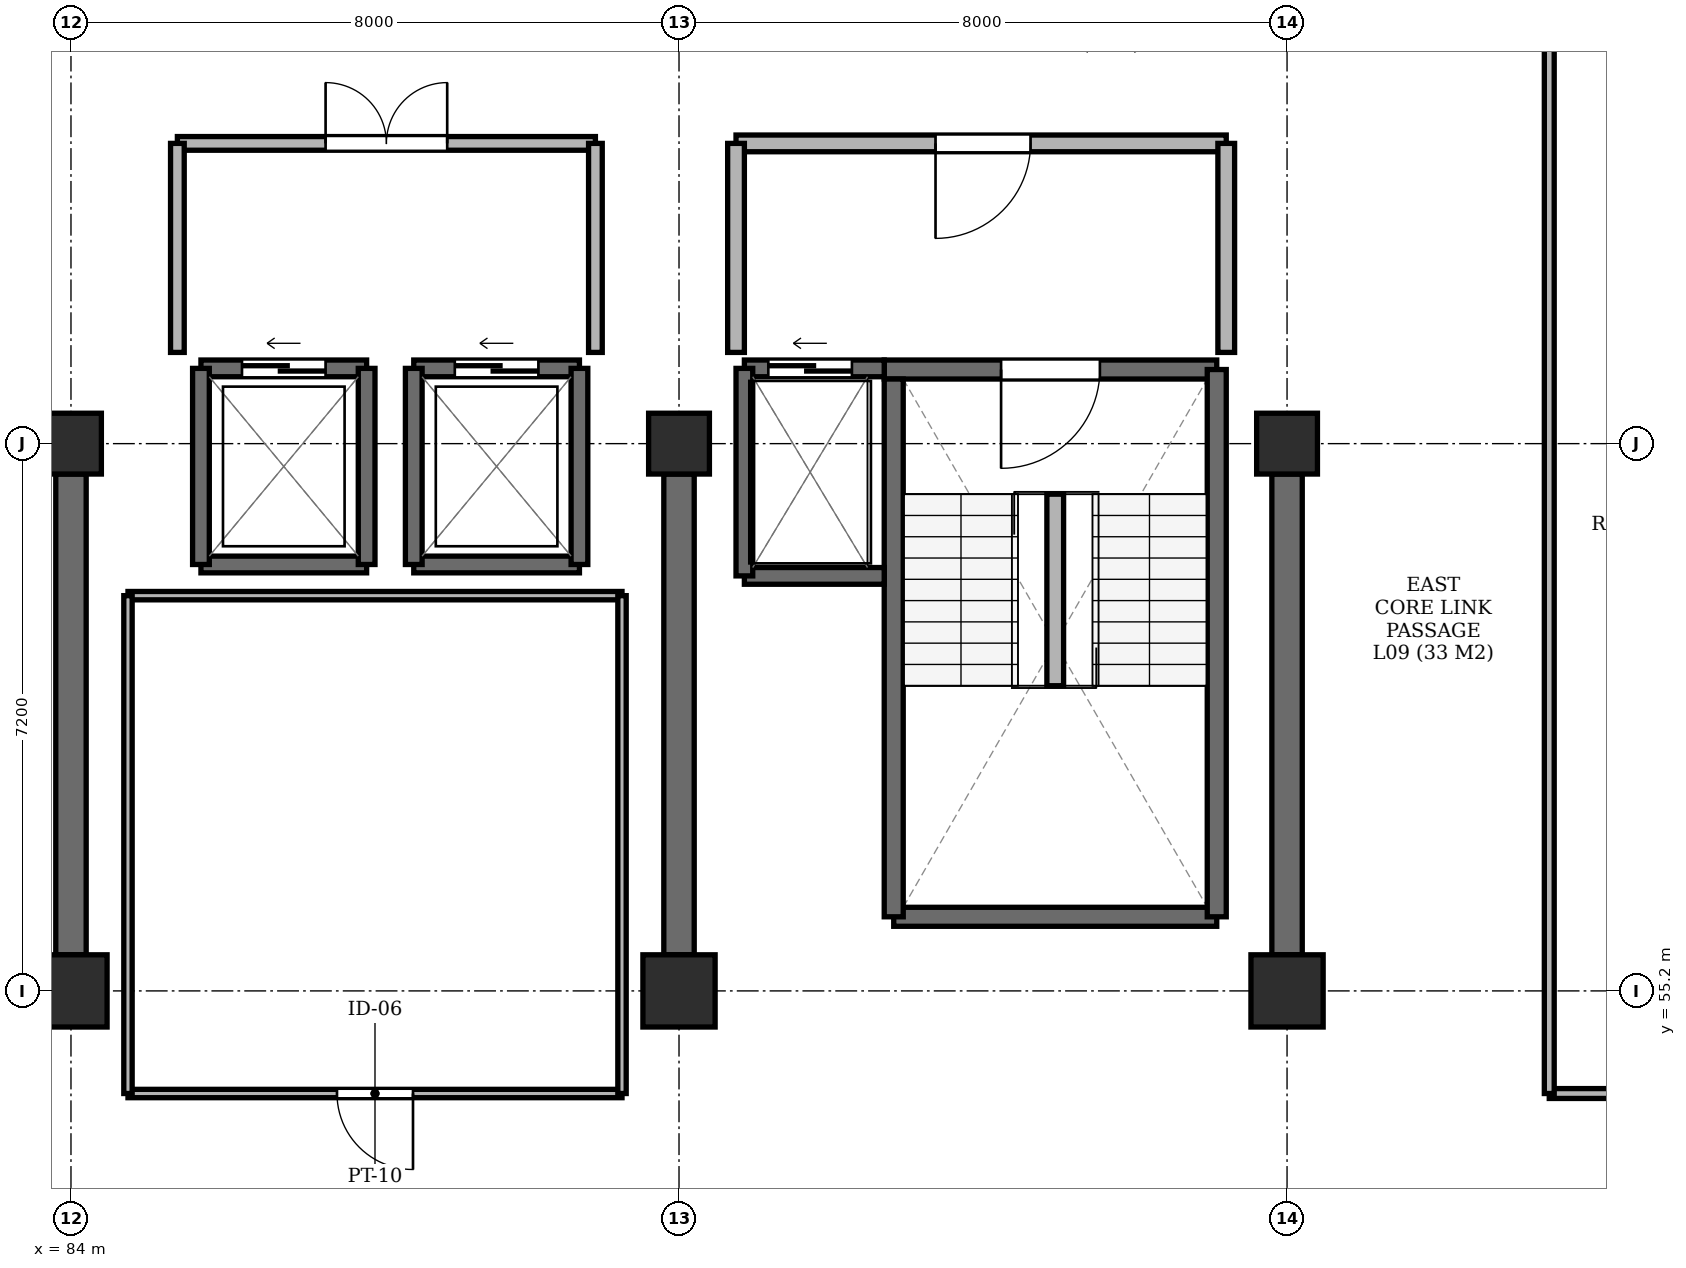
"""IFC4 building model, lengths in metres.
Left out: names, types, materials, properties, quantities, classifications, styles, units other than length and angle.
Written with IfcOpenShell. Run it as: python <this file> out.ifc"""

import sys

from ifc_helpers import new_model, si_unit, direction, frame, frame_2d, origin, origin_2d, place, context, subcontext, project, spatial, rectangle, extrude, element, fill, save


model = new_model("IFC4")
c1 = context("Model", 3, precision=1e-05, world=origin(), true_north=direction((0.0, 1.0)))
c2 = subcontext(c1, "Body", "Model", "MODEL_VIEW")
j1 = project(units=[si_unit("LENGTHUNIT", "METRE"), si_unit("PLANEANGLEUNIT", "RADIAN")], contexts=[c1])
p1 = place(None, origin())
s1 = spatial("IfcSite", under=j1, at=p1, CompositionType="ELEMENT")
p2 = place(p1, origin())
s2 = spatial("IfcBuilding", under=s1, at=p2, CompositionType="ELEMENT")
p3 = place(p2, frame((0.0, 0.0, 40.55)))
s3 = spatial("IfcBuildingStorey", under=s2, at=p3, CompositionType="ELEMENT", Elevation=40.55)
p4 = place(p3, frame((84.0, 55.2, -0.24), z_axis=(0.0, 0.0, 1.0), x_axis=(1.0, 0.0, 0.0)))
e1 = element("IfcColumn", 1, at=p4, inside=s3, PredefinedType="COLUMN", context=c2, shape_type="SweptSolid", body=[
    extrude(rectangle(XDim=0.95, YDim=0.95, at=origin_2d()), origin(), (0.0, 0.0, 1.0), 3.25),
])
p5 = place(p3, frame((84.0, 62.4, -0.24), z_axis=(0.0, 0.0, 1.0), x_axis=(1.0, 0.0, 0.0)))
e2 = element("IfcColumn", 2, at=p5, inside=s3, PredefinedType="COLUMN", context=c2, shape_type="SweptSolid", body=[
    extrude(rectangle(XDim=0.8, YDim=0.8, at=origin_2d()), origin(), (0.0, 0.0, 1.0), 3.25),
])
p6 = place(p3, frame((92.0, 55.2, -0.24), z_axis=(0.0, 0.0, 1.0), x_axis=(1.0, 0.0, 0.0)))
e3 = element("IfcColumn", 3, at=p6, inside=s3, PredefinedType="COLUMN", context=c2, shape_type="SweptSolid", body=[
    extrude(rectangle(XDim=0.95, YDim=0.95, at=origin_2d()), origin(), (0.0, 0.0, 1.0), 3.25),
])
p7 = place(p3, frame((92.0, 62.4, -0.24), z_axis=(0.0, 0.0, 1.0), x_axis=(1.0, 0.0, 0.0)))
e4 = element("IfcColumn", 4, at=p7, inside=s3, PredefinedType="COLUMN", context=c2, shape_type="SweptSolid", body=[
    extrude(rectangle(XDim=0.8, YDim=0.8, at=origin_2d()), origin(), (0.0, 0.0, 1.0), 3.25),
])
p8 = place(p3, frame((100.0, 55.2, -0.24), z_axis=(0.0, 0.0, 1.0), x_axis=(1.0, 0.0, 0.0)))
e5 = element("IfcColumn", 5, at=p8, inside=s3, PredefinedType="COLUMN", context=c2, shape_type="SweptSolid", body=[
    extrude(rectangle(XDim=0.95, YDim=0.95, at=origin_2d()), origin(), (0.0, 0.0, 1.0), 3.25),
])
p9 = place(p3, frame((100.0, 62.4, -0.24), z_axis=(0.0, 0.0, 1.0), x_axis=(1.0, 0.0, 0.0)))
e6 = element("IfcColumn", 6, at=p9, inside=s3, PredefinedType="COLUMN", context=c2, shape_type="SweptSolid", body=[
    extrude(rectangle(XDim=0.8, YDim=0.8, at=origin_2d()), origin(), (0.0, 0.0, 1.0), 3.25),
])
for number, where, z_axis, x_axis in (
    (7, (84.0, 55.675, 0.0), (0.0, 0.0, 1.0), (0.0, 1.0, 0.0)),
    (8, (92.0, 55.675, 0.0), (0.0, 0.0, 1.0), (0.0, 1.0, 0.0)),
    (9, (100.0, 55.675, 0.0), (0.0, 0.0, 1.0), (0.0, 1.0, 0.0)),
):
    element("IfcWall", number, at=place(p3, frame(where, z_axis=z_axis, x_axis=x_axis)), inside=s3, PredefinedType="SHEAR", context=c2, shape_type="SweptSolid", body=[
        extrude(rectangle(XDim=6.325, YDim=0.4, at=frame_2d((3.163, 0.0))), origin(), (0.0, 0.0, 1.0), 3.01),
    ])
p10 = place(p3, frame((94.825, 56.175, 0.0), z_axis=(0.0, 0.0, 1.0), x_axis=(1.0, 0.0, 0.0)))
e10 = element("IfcWall", 10, at=p10, inside=s3, PredefinedType="SHEAR", context=c2, shape_type="SweptSolid", body=[
    extrude(rectangle(XDim=4.25, YDim=0.25, at=frame_2d((2.125, 0.0))), origin(), (0.0, 0.0, 1.0), 3.01),
])
p11 = place(p3, frame((99.075, 63.375, 0.0), z_axis=(0.0, 0.0, 1.0), x_axis=(-1.0, 0.0, 0.0)))
e11 = element("IfcWall", 11, at=p11, inside=s3, PredefinedType="SHEAR", context=c2, shape_type="SweptSolid", body=[
    extrude(rectangle(XDim=4.375, YDim=0.25, at=frame_2d((2.188, 0.0))), origin(), (0.0, 0.0, 1.0), 3.01),
])
p12 = place(p11, frame((1.538, 0.0, 0.0)))
e12 = element("IfcOpeningElement", 12, at=p12, cuts=e11, PredefinedType="OPENING", context=c2, shape_type="SweptSolid", body=[
    extrude(rectangle(XDim=1.3, YDim=2.2, at=frame_2d((0.65, 1.1))), frame((0.0, 0.137, 0.0), z_axis=(0.0, -1.0, 0.0), x_axis=(1.0, 0.0, 0.0)), (0.0, 0.0, 1.0), 0.274),
])
p13 = place(p3, frame((94.825, 63.25, 0.0), z_axis=(0.0, 0.0, 1.0), x_axis=(0.0, -1.0, 0.0)))
e13 = element("IfcWall", 13, at=p13, inside=s3, PredefinedType="SHEAR", context=c2, shape_type="SweptSolid", body=[
    extrude(rectangle(XDim=7.075, YDim=0.25, at=frame_2d((3.538, 0.0))), origin(), (0.0, 0.0, 1.0), 3.01),
])
p14 = place(p3, frame((99.075, 56.175, 0.0), z_axis=(0.0, 0.0, 1.0), x_axis=(0.0, 1.0, 0.0)))
e14 = element("IfcWall", 14, at=p14, inside=s3, PredefinedType="SHEAR", context=c2, shape_type="SweptSolid", body=[
    extrude(rectangle(XDim=7.2, YDim=0.25, at=frame_2d((3.6, 0.0))), origin(), (0.0, 0.0, 1.0), 3.01),
])
p15 = place(p3, frame((96.95, 59.215, 0.0), z_axis=(0.0, 0.0, 1.0), x_axis=(0.0, 1.0, 0.0)))
e15 = element("IfcWall", 15, at=p15, inside=s3, PredefinedType="PARTITIONING", context=c2, shape_type="SweptSolid", body=[
    extrude(rectangle(XDim=2.52, YDim=0.22, at=frame_2d((1.26, 0.0))), origin(), (0.0, 0.0, 1.0), 3.01),
])
p16 = place(p3, frame((92.86, 60.66, 0.0), z_axis=(0.0, 0.0, 1.0), x_axis=(1.0, 0.0, 0.0)))
e16 = element("IfcWall", 16, at=p16, inside=s3, PredefinedType="SHEAR", context=c2, shape_type="SweptSolid", body=[
    extrude(rectangle(XDim=1.84, YDim=0.22, at=frame_2d((0.92, 0.0))), origin(), (0.0, 0.0, 1.0), 3.01),
])
p17 = place(p3, frame((94.7, 63.39, 0.0), z_axis=(0.0, 0.0, 1.0), x_axis=(-1.0, 0.0, 0.0)))
e17 = element("IfcWall", 17, at=p17, inside=s3, PredefinedType="SHEAR", context=c2, shape_type="SweptSolid", body=[
    extrude(rectangle(XDim=1.84, YDim=0.22, at=frame_2d((0.92, 0.0))), origin(), (0.0, 0.0, 1.0), 3.01),
])
p18 = place(p17, frame((0.425, 0.0, 0.0)))
e18 = element("IfcOpeningElement", 18, at=p18, cuts=e17, PredefinedType="OPENING", context=c2, shape_type="SweptSolid", body=[
    extrude(rectangle(XDim=1.1, YDim=2.2, at=frame_2d((0.55, 1.1))), frame((0.0, 0.122, 0.0), z_axis=(0.0, -1.0, 0.0), x_axis=(1.0, 0.0, 0.0)), (0.0, 0.0, 1.0), 0.244),
])
p19 = place(p3, frame((92.86, 63.39, 0.0), z_axis=(0.0, 0.0, 1.0), x_axis=(0.0, -1.0, 0.0)))
e19 = element("IfcWall", 19, at=p19, inside=s3, PredefinedType="SHEAR", context=c2, shape_type="SweptSolid", body=[
    extrude(rectangle(XDim=2.73, YDim=0.22, at=frame_2d((1.365, 0.0))), origin(), (0.0, 0.0, 1.0), 3.01),
])
p20 = place(p3, frame((85.71, 60.81, 0.0), z_axis=(0.0, 0.0, 1.0), x_axis=(1.0, 0.0, 0.0)))
e20 = element("IfcWall", 20, at=p20, inside=s3, PredefinedType="SHEAR", context=c2, shape_type="SweptSolid", body=[
    extrude(rectangle(XDim=2.18, YDim=0.22, at=frame_2d((1.09, 0.0))), origin(), (0.0, 0.0, 1.0), 3.01),
])
p21 = place(p3, frame((87.89, 63.39, 0.0), z_axis=(0.0, 0.0, 1.0), x_axis=(-1.0, 0.0, 0.0)))
e21 = element("IfcWall", 21, at=p21, inside=s3, PredefinedType="SHEAR", context=c2, shape_type="SweptSolid", body=[
    extrude(rectangle(XDim=2.18, YDim=0.22, at=frame_2d((1.09, 0.0))), origin(), (0.0, 0.0, 1.0), 3.01),
])
p22 = place(p21, frame((0.54, 0.0, 0.0)))
e22 = element("IfcOpeningElement", 22, at=p22, cuts=e21, PredefinedType="OPENING", context=c2, shape_type="SweptSolid", body=[
    extrude(rectangle(XDim=1.1, YDim=2.2, at=frame_2d((0.55, 1.1))), frame((0.0, 0.122, 0.0), z_axis=(0.0, -1.0, 0.0), x_axis=(1.0, 0.0, 0.0)), (0.0, 0.0, 1.0), 0.244),
])
for number, where, z_axis, x_axis in (
    (23, (85.71, 63.39, 0.0), (0.0, 0.0, 1.0), (0.0, -1.0, 0.0)),
    (24, (87.89, 60.81, 0.0), (0.0, 0.0, 1.0), (0.0, 1.0, 0.0)),
):
    element("IfcWall", number, at=place(p3, frame(where, z_axis=z_axis, x_axis=x_axis)), inside=s3, PredefinedType="SHEAR", context=c2, shape_type="SweptSolid", body=[
        extrude(rectangle(XDim=2.58, YDim=0.22, at=frame_2d((1.29, 0.0))), origin(), (0.0, 0.0, 1.0), 3.01),
    ])
p23 = place(p3, frame((88.51, 60.81, 0.0), z_axis=(0.0, 0.0, 1.0), x_axis=(1.0, 0.0, 0.0)))
e25 = element("IfcWall", 25, at=p23, inside=s3, PredefinedType="SHEAR", context=c2, shape_type="SweptSolid", body=[
    extrude(rectangle(XDim=2.18, YDim=0.22, at=frame_2d((1.09, 0.0))), origin(), (0.0, 0.0, 1.0), 3.01),
])
p24 = place(p3, frame((90.69, 63.39, 0.0), z_axis=(0.0, 0.0, 1.0), x_axis=(-1.0, 0.0, 0.0)))
e26 = element("IfcWall", 26, at=p24, inside=s3, PredefinedType="SHEAR", context=c2, shape_type="SweptSolid", body=[
    extrude(rectangle(XDim=2.18, YDim=0.22, at=frame_2d((1.09, 0.0))), origin(), (0.0, 0.0, 1.0), 3.01),
])
p25 = place(p24, frame((0.54, 0.0, 0.0)))
e27 = element("IfcOpeningElement", 27, at=p25, cuts=e26, PredefinedType="OPENING", context=c2, shape_type="SweptSolid", body=[
    extrude(rectangle(XDim=1.1, YDim=2.2, at=frame_2d((0.55, 1.1))), frame((0.0, 0.122, 0.0), z_axis=(0.0, -1.0, 0.0), x_axis=(1.0, 0.0, 0.0)), (0.0, 0.0, 1.0), 0.244),
])
for number, where, z_axis, x_axis in (
    (28, (88.51, 63.39, 0.0), (0.0, 0.0, 1.0), (0.0, -1.0, 0.0)),
    (29, (90.69, 60.81, 0.0), (0.0, 0.0, 1.0), (0.0, 1.0, 0.0)),
):
    element("IfcWall", number, at=place(p3, frame(where, z_axis=z_axis, x_axis=x_axis)), inside=s3, PredefinedType="SHEAR", context=c2, shape_type="SweptSolid", body=[
        extrude(rectangle(XDim=2.58, YDim=0.22, at=frame_2d((1.29, 0.0))), origin(), (0.0, 0.0, 1.0), 3.01),
    ])
p26 = place(p3, frame((92.75, 66.35, 0.0), z_axis=(0.0, 0.0, 1.0), x_axis=(1.0, 0.0, 0.0)))
e30 = element("IfcWall", 30, at=p26, inside=s3, PredefinedType="PARTITIONING", context=c2, shape_type="SweptSolid", body=[
    extrude(rectangle(XDim=6.45, YDim=0.22, at=frame_2d((3.225, 0.0))), origin(), (0.0, 0.0, 1.0), 2.53),
])
p27 = place(p26, frame((2.625, 0.0, 0.0)))
e31 = element("IfcOpeningElement", 31, at=p27, cuts=e30, PredefinedType="OPENING", context=c2, shape_type="SweptSolid", body=[
    extrude(rectangle(XDim=1.25, YDim=2.2, at=frame_2d((0.625, 1.1))), frame((0.0, 0.122, 0.0), z_axis=(0.0, -1.0, 0.0), x_axis=(1.0, 0.0, 0.0)), (0.0, 0.0, 1.0), 0.244),
])
for number, where, z_axis, x_axis in (
    (32, (92.75, 63.6, 0.0), (0.0, 0.0, 1.0), (0.0, 1.0, 0.0)),
    (33, (99.2, 63.6, 0.0), (0.0, 0.0, 1.0), (0.0, 1.0, 0.0)),
):
    element("IfcWall", number, at=place(p3, frame(where, z_axis=z_axis, x_axis=x_axis)), inside=s3, PredefinedType="PARTITIONING", context=c2, shape_type="SweptSolid", body=[
        extrude(rectangle(XDim=2.75, YDim=0.22, at=frame_2d((1.375, 0.0))), origin(), (0.0, 0.0, 1.0), 2.53),
    ])
p28 = place(p3, frame((85.4, 66.35, 0.0), z_axis=(0.0, 0.0, 1.0), x_axis=(1.0, 0.0, 0.0)))
e34 = element("IfcWall", 34, at=p28, inside=s3, PredefinedType="PARTITIONING", context=c2, shape_type="SweptSolid", body=[
    extrude(rectangle(XDim=5.5, YDim=0.18, at=frame_2d((2.75, 0.0))), origin(), (0.0, 0.0, 1.0), 2.53),
])
p29 = place(p28, frame((1.95, 0.0, 0.0)))
e35 = element("IfcOpeningElement", 35, at=p29, cuts=e34, PredefinedType="OPENING", context=c2, shape_type="SweptSolid", body=[
    extrude(rectangle(XDim=1.6, YDim=2.2, at=frame_2d((0.8, 1.1))), frame((0.0, 0.102, 0.0), z_axis=(0.0, -1.0, 0.0), x_axis=(1.0, 0.0, 0.0)), (0.0, 0.0, 1.0), 0.204),
])
for number, where, z_axis, x_axis in (
    (36, (85.4, 63.6, 0.0), (0.0, 0.0, 1.0), (0.0, 1.0, 0.0)),
    (37, (90.9, 63.6, 0.0), (0.0, 0.0, 1.0), (0.0, 1.0, 0.0)),
):
    element("IfcWall", number, at=place(p3, frame(where, z_axis=z_axis, x_axis=x_axis)), inside=s3, PredefinedType="PARTITIONING", context=c2, shape_type="SweptSolid", body=[
        extrude(rectangle(XDim=2.75, YDim=0.18, at=frame_2d((1.375, 0.0))), origin(), (0.0, 0.0, 1.0), 2.53),
    ])
p30 = place(p3, frame((103.45, 53.85, 0.0), z_axis=(0.0, 0.0, 1.0), x_axis=(1.0, 0.0, 0.0)))
e38 = element("IfcWall", 38, at=p30, inside=s3, PredefinedType="PARTITIONING", context=c2, shape_type="SweptSolid", body=[
    extrude(rectangle(XDim=3.75, YDim=0.13, at=frame_2d((1.875, 0.0))), origin(), (0.0, 0.0, 1.0), 2.53),
])
p31 = place(p30, frame((1.325, 0.0, 0.0)))
e39 = element("IfcOpeningElement", 39, at=p31, cuts=e38, PredefinedType="OPENING", context=c2, shape_type="SweptSolid", body=[
    extrude(rectangle(XDim=1.05, YDim=2.15, at=frame_2d((0.525, 1.075))), frame((0.0, 0.077, 0.0), z_axis=(0.0, -1.0, 0.0), x_axis=(1.0, 0.0, 0.0)), (0.0, 0.0, 1.0), 0.154),
])
p32 = place(p3, frame((103.45, 53.85, 0.0), z_axis=(0.0, 0.0, 1.0), x_axis=(0.0, 1.0, 0.0)))
e40 = element("IfcWall", 40, at=p32, inside=s3, PredefinedType="PARTITIONING", context=c2, shape_type="SweptSolid", body=[
    extrude(rectangle(XDim=14.95, YDim=0.13, at=frame_2d((7.475, 0.0))), origin(), (0.0, 0.0, 1.0), 2.53),
])
p33 = place(p3, frame((84.75, 53.85, 0.0), z_axis=(0.0, 0.0, 1.0), x_axis=(1.0, 0.0, 0.0)))
e41 = element("IfcWall", 41, at=p33, inside=s3, PredefinedType="PARTITIONING", context=c2, shape_type="SweptSolid", body=[
    extrude(rectangle(XDim=6.5, YDim=0.11, at=frame_2d((3.25, 0.0))), origin(), (0.0, 0.0, 1.0), 2.53),
])
p34 = place(p33, frame((2.75, 0.0, 0.0)))
e42 = element("IfcOpeningElement", 42, at=p34, cuts=e41, PredefinedType="OPENING", context=c2, shape_type="SweptSolid", body=[
    extrude(rectangle(XDim=1.0, YDim=2.15, at=frame_2d((0.5, 1.075))), frame((0.0, 0.067, 0.0), z_axis=(0.0, -1.0, 0.0), x_axis=(1.0, 0.0, 0.0)), (0.0, 0.0, 1.0), 0.134),
])
p35 = place(p3, frame((84.75, 60.4, 0.0), z_axis=(0.0, 0.0, 1.0), x_axis=(1.0, 0.0, 0.0)))
e43 = element("IfcWall", 43, at=p35, inside=s3, PredefinedType="PARTITIONING", context=c2, shape_type="SweptSolid", body=[
    extrude(rectangle(XDim=6.5, YDim=0.11, at=frame_2d((3.25, 0.0))), origin(), (0.0, 0.0, 1.0), 2.53),
])
for number, where, z_axis, x_axis in (
    (44, (84.75, 53.85, 0.0), (0.0, 0.0, 1.0), (0.0, 1.0, 0.0)),
    (45, (91.25, 53.85, 0.0), (0.0, 0.0, 1.0), (0.0, 1.0, 0.0)),
):
    element("IfcWall", number, at=place(p3, frame(where, z_axis=z_axis, x_axis=x_axis)), inside=s3, PredefinedType="PARTITIONING", context=c2, shape_type="SweptSolid", body=[
        extrude(rectangle(XDim=6.55, YDim=0.11, at=frame_2d((3.275, 0.0))), origin(), (0.0, 0.0, 1.0), 2.53),
    ])
p36 = place(p12, origin())
e46 = element("IfcDoor", 46, at=p36, inside=s3, OperationType="SINGLE_SWING_RIGHT", PredefinedType="DOOR", context=c2, shape_type="SweptSolid", body=[
    extrude(rectangle(XDim=1.3, YDim=2.2, at=frame_2d((0.65, 1.1))), frame((0.0, 0.025, 0.0), z_axis=(0.0, -1.0, 0.0), x_axis=(1.0, 0.0, 0.0)), (0.0, 0.0, 1.0), 0.05),
])
fill(e12, e46)
p37 = place(p18, origin())
e47 = element("IfcDoor", 47, at=p37, inside=s3, OperationType="SLIDING_TO_RIGHT", PredefinedType="DOOR", context=c2, shape_type="SweptSolid", body=[
    extrude(rectangle(XDim=1.1, YDim=2.2, at=frame_2d((0.55, 1.1))), frame((0.0, 0.025, 0.0), z_axis=(0.0, -1.0, 0.0), x_axis=(1.0, 0.0, 0.0)), (0.0, 0.0, 1.0), 0.05),
])
fill(e18, e47)
p38 = place(p22, origin())
e48 = element("IfcDoor", 48, at=p38, inside=s3, OperationType="SLIDING_TO_RIGHT", PredefinedType="DOOR", context=c2, shape_type="SweptSolid", body=[
    extrude(rectangle(XDim=1.1, YDim=2.2, at=frame_2d((0.55, 1.1))), frame((0.0, 0.025, 0.0), z_axis=(0.0, -1.0, 0.0), x_axis=(1.0, 0.0, 0.0)), (0.0, 0.0, 1.0), 0.05),
])
fill(e22, e48)
p39 = place(p25, origin())
e49 = element("IfcDoor", 49, at=p39, inside=s3, OperationType="SLIDING_TO_RIGHT", PredefinedType="DOOR", context=c2, shape_type="SweptSolid", body=[
    extrude(rectangle(XDim=1.1, YDim=2.2, at=frame_2d((0.55, 1.1))), frame((0.0, 0.025, 0.0), z_axis=(0.0, -1.0, 0.0), x_axis=(1.0, 0.0, 0.0)), (0.0, 0.0, 1.0), 0.05),
])
fill(e27, e49)
p40 = place(p27, frame((1.25, 0.0, 0.0), z_axis=(0.0, 0.0, 1.0), x_axis=(-1.0, 0.0, 0.0)))
e50 = element("IfcDoor", 50, at=p40, inside=s3, OperationType="SINGLE_SWING_LEFT", PredefinedType="DOOR", context=c2, shape_type="SweptSolid", body=[
    extrude(rectangle(XDim=1.25, YDim=2.2, at=frame_2d((0.625, 1.1))), frame((0.0, 0.025, 0.0), z_axis=(0.0, -1.0, 0.0), x_axis=(1.0, 0.0, 0.0)), (0.0, 0.0, 1.0), 0.05),
])
fill(e31, e50)
p41 = place(p29, origin())
e51 = element("IfcDoor", 51, at=p41, inside=s3, OperationType="DOUBLE_DOOR_SINGLE_SWING", PredefinedType="DOOR", context=c2, shape_type="SweptSolid", body=[
    extrude(rectangle(XDim=1.6, YDim=2.2, at=frame_2d((0.8, 1.1))), frame((0.0, 0.025, 0.0), z_axis=(0.0, -1.0, 0.0), x_axis=(1.0, 0.0, 0.0)), (0.0, 0.0, 1.0), 0.05),
])
fill(e35, e51)
p42 = place(p34, frame((1.0, 0.0, 0.0), z_axis=(0.0, 0.0, 1.0), x_axis=(-1.0, 0.0, 0.0)))
e52 = element("IfcDoor", 52, at=p42, inside=s3, OperationType="SINGLE_SWING_RIGHT", PredefinedType="DOOR", context=c2, shape_type="SweptSolid", body=[
    extrude(rectangle(XDim=1.0, YDim=2.15, at=frame_2d((0.5, 1.075))), frame((0.0, 0.025, 0.0), z_axis=(0.0, -1.0, 0.0), x_axis=(1.0, 0.0, 0.0)), (0.0, 0.0, 1.0), 0.05),
])
fill(e42, e52)
save(model, sys.argv[1])
